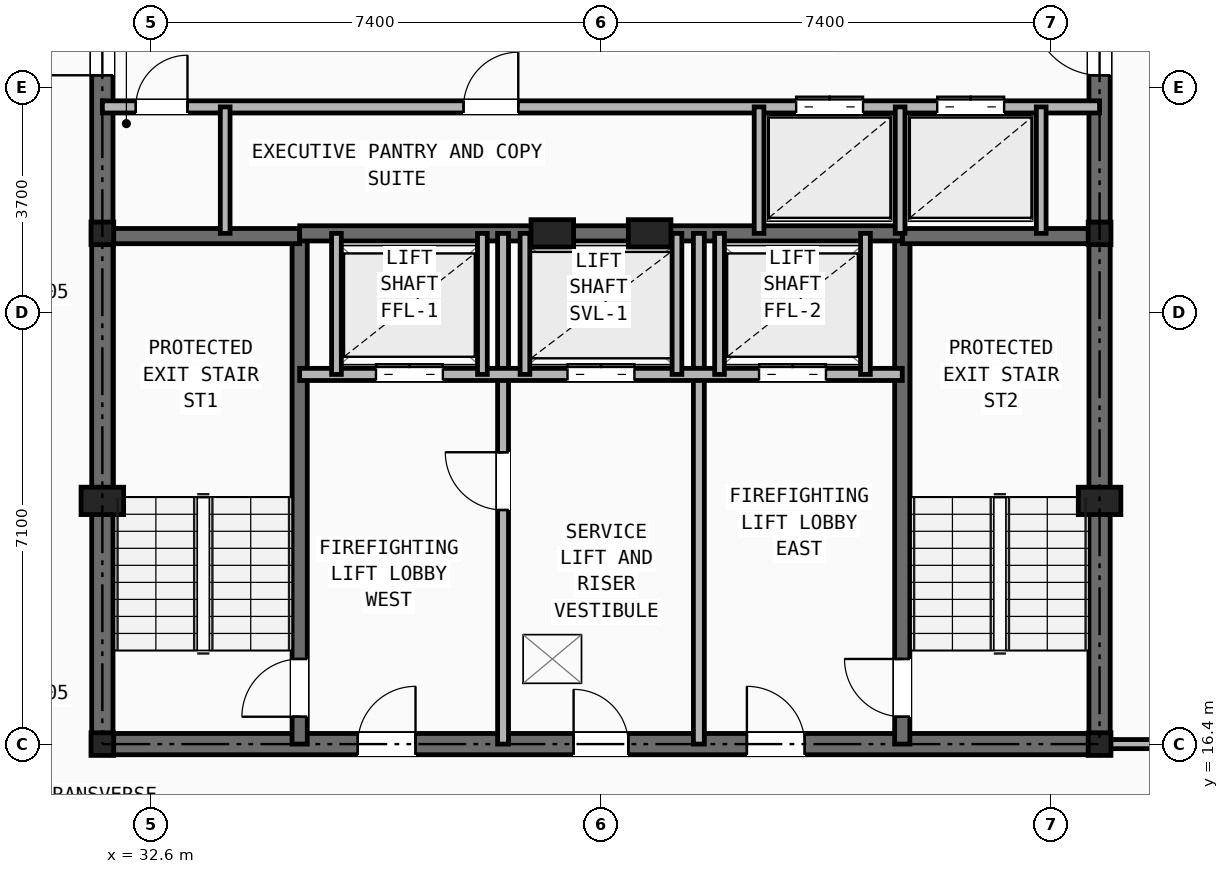
"""IFC4 building model, lengths in metres.
Left out: names, types, materials, properties, quantities, classifications, styles, units other than length and angle.
Written with IfcOpenShell. Run it as: python <this file> out.ifc"""

import sys

from ifc_helpers import new_model, si_unit, direction, frame, frame_2d, origin, origin_2d, place, context, subcontext, project, spatial, rectangle, i_section, extrude, element, fill, save


model = new_model("IFC4")
c1 = context("Model", 3, precision=1e-05, world=origin(), true_north=direction((0.0, 1.0)))
c2 = subcontext(c1, "Body", "Model", "MODEL_VIEW")
j1 = project(units=[si_unit("LENGTHUNIT", "METRE"), si_unit("PLANEANGLEUNIT", "RADIAN")], contexts=[c1])
p1 = place(None, origin())
s1 = spatial("IfcSite", under=j1, at=p1, CompositionType="ELEMENT")
p2 = place(p1, origin())
s2 = spatial("IfcBuilding", under=s1, at=p2, CompositionType="ELEMENT")
p3 = place(p2, frame((0.0, 0.0, 243.4)))
s3 = spatial("IfcBuildingStorey", under=s2, at=p3, CompositionType="ELEMENT", Elevation=243.4)
for number, where, z_axis, x_axis in (
    (1, (31.8, 16.4, 0.0), (0.0, 0.0, 1.0), (1.0, 0.0, 0.0)),
    (2, (48.2, 16.4, 0.0), (0.0, 0.0, 1.0), (1.0, 0.0, 0.0)),
    (3, (31.8, 24.8, 0.0), (0.0, 0.0, 1.0), (1.0, 0.0, 0.0)),
    (4, (48.2, 24.8, 0.0), (0.0, 0.0, 1.0), (1.0, 0.0, 0.0)),
):
    element("IfcColumn", number, at=place(p3, frame(where, z_axis=z_axis, x_axis=x_axis)), inside=s3, PredefinedType="COLUMN", context=c2, shape_type="SweptSolid", body=[
        extrude(i_section(OverallWidth=0.374, OverallDepth=0.372, WebThickness=0.016, FlangeThickness=0.026, at=origin_2d()), origin(), (0.0, 0.0, 1.0), 3.5),
    ])
for number, where, z_axis, x_axis in (
    (5, (31.8, 20.4, 0.0), (0.0, 0.0, 1.0), (1.0, 0.0, 0.0)),
    (6, (48.2, 20.4, 0.0), (0.0, 0.0, 1.0), (1.0, 0.0, 0.0)),
    (7, (39.2, 24.8, 0.0), (0.0, 0.0, 1.0), (1.0, 0.0, 0.0)),
    (8, (40.8, 24.8, 0.0), (0.0, 0.0, 1.0), (1.0, 0.0, 0.0)),
):
    element("IfcColumn", number, at=place(p3, frame(where, z_axis=z_axis, x_axis=x_axis)), inside=s3, PredefinedType="PILASTER", context=c2, shape_type="SweptSolid", body=[
        extrude(rectangle(XDim=0.7, YDim=0.45, at=origin_2d()), origin(), (0.0, 0.0, 1.0), 3.5),
    ])
p4 = place(p3, frame((31.8, 16.4, 0.0), z_axis=(0.0, 0.0, 1.0), x_axis=(1.0, 0.0, 0.0)))
e9 = element("IfcWall", 9, at=p4, inside=s3, PredefinedType="SHEAR", context=c2, shape_type="SweptSolid", body=[
    extrude(rectangle(XDim=16.4, YDim=0.35, at=frame_2d((8.2, 0.0))), origin(), (0.0, 0.0, 1.0), 3.25),
])
p5 = place(p4, frame((7.75, 0.0, 0.0)))
e10 = element("IfcOpeningElement", 10, at=p5, cuts=e9, PredefinedType="OPENING", context=c2, shape_type="SweptSolid", body=[
    extrude(rectangle(XDim=0.9, YDim=2.1, at=frame_2d((0.45, 1.05))), frame((0.0, 0.185, 0.0), z_axis=(0.0, -1.0, 0.0), x_axis=(1.0, 0.0, 0.0)), (0.0, 0.0, 1.0), 0.37),
])
p6 = place(p4, frame((4.2, 0.0, 0.0)))
e11 = element("IfcOpeningElement", 11, at=p6, cuts=e9, PredefinedType="OPENING", context=c2, shape_type="SweptSolid", body=[
    extrude(rectangle(XDim=0.95, YDim=2.1, at=frame_2d((0.475, 1.05))), frame((0.0, 0.185, 0.0), z_axis=(0.0, -1.0, 0.0), x_axis=(1.0, 0.0, 0.0)), (0.0, 0.0, 1.0), 0.37),
])
p7 = place(p4, frame((10.6, 0.0, 0.0)))
e12 = element("IfcOpeningElement", 12, at=p7, cuts=e9, PredefinedType="OPENING", context=c2, shape_type="SweptSolid", body=[
    extrude(rectangle(XDim=0.95, YDim=2.1, at=frame_2d((0.475, 1.05))), frame((0.0, 0.185, 0.0), z_axis=(0.0, -1.0, 0.0), x_axis=(1.0, 0.0, 0.0)), (0.0, 0.0, 1.0), 0.37),
])
p8 = place(p3, frame((31.8, 16.4, 0.0), z_axis=(0.0, 0.0, 1.0), x_axis=(0.0, 1.0, 0.0)))
e13 = element("IfcWall", 13, at=p8, inside=s3, PredefinedType="SHEAR", context=c2, shape_type="SweptSolid", body=[
    extrude(rectangle(XDim=14.8, YDim=0.35, at=frame_2d((7.4, 0.0))), origin(), (0.0, 0.0, 1.0), 3.25),
])
p9 = place(p8, frame((11.0, 0.0, 0.0)))
e14 = element("IfcOpeningElement", 14, at=p9, cuts=e13, PredefinedType="OPENING", context=c2, shape_type="SweptSolid", body=[
    extrude(rectangle(XDim=1.1, YDim=2.15, at=frame_2d((0.55, 1.075))), frame((0.0, 0.185, 0.0), z_axis=(0.0, -1.0, 0.0), x_axis=(1.0, 0.0, 0.0)), (0.0, 0.0, 1.0), 0.37),
])
p10 = place(p3, frame((48.2, 16.4, 0.0), z_axis=(0.0, 0.0, 1.0), x_axis=(0.0, 1.0, 0.0)))
e15 = element("IfcWall", 15, at=p10, inside=s3, PredefinedType="SHEAR", context=c2, shape_type="SweptSolid", body=[
    extrude(rectangle(XDim=14.8, YDim=0.35, at=frame_2d((7.4, 0.0))), origin(), (0.0, 0.0, 1.0), 3.25),
])
p11 = place(p10, frame((11.0, 0.0, 0.0)))
e16 = element("IfcOpeningElement", 16, at=p11, cuts=e15, PredefinedType="OPENING", context=c2, shape_type="SweptSolid", body=[
    extrude(rectangle(XDim=1.1, YDim=2.15, at=frame_2d((0.55, 1.075))), frame((0.0, 0.185, 0.0), z_axis=(0.0, -1.0, 0.0), x_axis=(1.0, 0.0, 0.0)), (0.0, 0.0, 1.0), 0.37),
])
p12 = place(p3, frame((35.045, 16.4, 0.0), z_axis=(0.0, 0.0, 1.0), x_axis=(0.0, 1.0, 0.0)))
e17 = element("IfcWall", 17, at=p12, inside=s3, PredefinedType="SHEAR", context=c2, shape_type="SweptSolid", body=[
    extrude(rectangle(XDim=8.4, YDim=0.25, at=frame_2d((4.2, 0.0))), origin(), (0.0, 0.0, 1.0), 3.25),
])
p13 = place(p12, frame((0.45, 0.0, 0.0)))
e18 = element("IfcOpeningElement", 18, at=p13, cuts=e17, PredefinedType="OPENING", context=c2, shape_type="SweptSolid", body=[
    extrude(rectangle(XDim=0.95, YDim=2.1, at=frame_2d((0.475, 1.05))), frame((0.0, 0.135, 0.0), z_axis=(0.0, -1.0, 0.0), x_axis=(1.0, 0.0, 0.0)), (0.0, 0.0, 1.0), 0.27),
])
p14 = place(p3, frame((31.8, 24.755, 0.0), z_axis=(0.0, 0.0, 1.0), x_axis=(1.0, 0.0, 0.0)))
e19 = element("IfcWall", 19, at=p14, inside=s3, PredefinedType="SHEAR", context=c2, shape_type="SweptSolid", body=[
    extrude(rectangle(XDim=3.245, YDim=0.25, at=frame_2d((1.623, 0.0))), origin(), (0.0, 0.0, 1.0), 3.25),
])
p15 = place(p3, frame((44.955, 16.4, 0.0), z_axis=(0.0, 0.0, 1.0), x_axis=(0.0, 1.0, 0.0)))
e20 = element("IfcWall", 20, at=p15, inside=s3, PredefinedType="SHEAR", context=c2, shape_type="SweptSolid", body=[
    extrude(rectangle(XDim=8.4, YDim=0.25, at=frame_2d((4.2, 0.0))), origin(), (0.0, 0.0, 1.0), 3.25),
])
p16 = place(p15, frame((0.45, 0.0, 0.0)))
e21 = element("IfcOpeningElement", 21, at=p16, cuts=e20, PredefinedType="OPENING", context=c2, shape_type="SweptSolid", body=[
    extrude(rectangle(XDim=0.95, YDim=2.1, at=frame_2d((0.475, 1.05))), frame((0.0, 0.135, 0.0), z_axis=(0.0, -1.0, 0.0), x_axis=(1.0, 0.0, 0.0)), (0.0, 0.0, 1.0), 0.27),
])
p17 = place(p3, frame((44.955, 24.755, 0.0), z_axis=(0.0, 0.0, 1.0), x_axis=(1.0, 0.0, 0.0)))
e22 = element("IfcWall", 22, at=p17, inside=s3, PredefinedType="SHEAR", context=c2, shape_type="SweptSolid", body=[
    extrude(rectangle(XDim=3.245, YDim=0.25, at=frame_2d((1.623, 0.0))), origin(), (0.0, 0.0, 1.0), 3.25),
])
p18 = place(p3, frame((35.045, 24.8, 0.0), z_axis=(0.0, 0.0, 1.0), x_axis=(1.0, 0.0, 0.0)))
e23 = element("IfcWall", 23, at=p18, inside=s3, PredefinedType="SHEAR", context=c2, shape_type="SweptSolid", body=[
    extrude(rectangle(XDim=9.91, YDim=0.25, at=frame_2d((4.955, 0.0))), origin(), (0.0, 0.0, 1.0), 3.25),
])
p19 = place(p3, frame((38.39, 16.4, 0.0), z_axis=(0.0, 0.0, 1.0), x_axis=(0.0, 1.0, 0.0)))
e24 = element("IfcWall", 24, at=p19, inside=s3, PredefinedType="PARTITIONING", context=c2, shape_type="SweptSolid", body=[
    extrude(rectangle(XDim=8.4, YDim=0.18, at=frame_2d((4.2, 0.0))), origin(), (0.0, 0.0, 1.0), 2.705),
])
p20 = place(p19, frame((3.85, 0.0, 0.0)))
e25 = element("IfcOpeningElement", 25, at=p20, cuts=e24, PredefinedType="OPENING", context=c2, shape_type="SweptSolid", body=[
    extrude(rectangle(XDim=0.95, YDim=2.1, at=frame_2d((0.475, 1.05))), frame((0.0, 0.1, 0.0), z_axis=(0.0, -1.0, 0.0), x_axis=(1.0, 0.0, 0.0)), (0.0, 0.0, 1.0), 0.2),
])
p21 = place(p3, frame((41.61, 16.4, 0.0), z_axis=(0.0, 0.0, 1.0), x_axis=(0.0, 1.0, 0.0)))
e26 = element("IfcWall", 26, at=p21, inside=s3, PredefinedType="PARTITIONING", context=c2, shape_type="SweptSolid", body=[
    extrude(rectangle(XDim=8.4, YDim=0.18, at=frame_2d((4.2, 0.0))), origin(), (0.0, 0.0, 1.0), 2.705),
])
p22 = place(p3, frame((35.045, 22.48, 0.0), z_axis=(0.0, 0.0, 1.0), x_axis=(1.0, 0.0, 0.0)))
e27 = element("IfcWall", 27, at=p22, inside=s3, PredefinedType="SOLIDWALL", context=c2, shape_type="SweptSolid", body=[
    extrude(rectangle(XDim=9.91, YDim=0.2, at=frame_2d((4.955, 0.0))), origin(), (0.0, 0.0, 1.0), 3.25),
])
p23 = place(p22, frame((1.255, 0.0, 0.0)))
e28 = element("IfcOpeningElement", 28, at=p23, cuts=e27, PredefinedType="OPENING", context=c2, shape_type="SweptSolid", body=[
    extrude(rectangle(XDim=1.1, YDim=2.15, at=frame_2d((0.55, 1.075))), frame((0.0, 0.11, 0.0), z_axis=(0.0, -1.0, 0.0), x_axis=(1.0, 0.0, 0.0)), (0.0, 0.0, 1.0), 0.22),
])
p24 = place(p22, frame((7.555, 0.0, 0.0)))
e29 = element("IfcOpeningElement", 29, at=p24, cuts=e27, PredefinedType="OPENING", context=c2, shape_type="SweptSolid", body=[
    extrude(rectangle(XDim=1.1, YDim=2.15, at=frame_2d((0.55, 1.075))), frame((0.0, 0.11, 0.0), z_axis=(0.0, -1.0, 0.0), x_axis=(1.0, 0.0, 0.0)), (0.0, 0.0, 1.0), 0.22),
])
p25 = place(p22, frame((4.405, 0.0, 0.0)))
e30 = element("IfcOpeningElement", 30, at=p25, cuts=e27, PredefinedType="OPENING", context=c2, shape_type="SweptSolid", body=[
    extrude(rectangle(XDim=1.1, YDim=2.15, at=frame_2d((0.55, 1.075))), frame((0.0, 0.11, 0.0), z_axis=(0.0, -1.0, 0.0), x_axis=(1.0, 0.0, 0.0)), (0.0, 0.0, 1.0), 0.22),
])
for number, where, z_axis, x_axis in (
    (31, (35.65, 22.48, 0.0), (0.0, 0.0, 1.0), (0.0, 1.0, 0.0)),
    (32, (38.05, 22.48, 0.0), (0.0, 0.0, 1.0), (0.0, 1.0, 0.0)),
    (33, (41.95, 22.48, 0.0), (0.0, 0.0, 1.0), (0.0, 1.0, 0.0)),
    (34, (44.35, 22.48, 0.0), (0.0, 0.0, 1.0), (0.0, 1.0, 0.0)),
    (35, (38.75, 22.48, 0.0), (0.0, 0.0, 1.0), (0.0, 1.0, 0.0)),
    (36, (41.25, 22.48, 0.0), (0.0, 0.0, 1.0), (0.0, 1.0, 0.0)),
):
    element("IfcWall", number, at=place(p3, frame(where, z_axis=z_axis, x_axis=x_axis)), inside=s3, PredefinedType="SOLIDWALL", context=c2, shape_type="SweptSolid", body=[
        extrude(rectangle(XDim=2.32, YDim=0.16, at=frame_2d((1.16, 0.0))), origin(), (0.0, 0.0, 1.0), 3.25),
    ])
p26 = place(p3, frame((31.8, 26.88, 0.0), z_axis=(0.0, 0.0, 1.0), x_axis=(1.0, 0.0, 0.0)))
e37 = element("IfcWall", 37, at=p26, inside=s3, PredefinedType="SOLIDWALL", context=c2, shape_type="SweptSolid", body=[
    extrude(rectangle(XDim=16.4, YDim=0.2, at=frame_2d((8.2, 0.0))), origin(), (0.0, 0.0, 1.0), 2.705),
])
p27 = place(p26, frame((0.55, 0.0, 0.0)))
e38 = element("IfcOpeningElement", 38, at=p27, cuts=e37, PredefinedType="OPENING", context=c2, shape_type="SweptSolid", body=[
    extrude(rectangle(XDim=0.85, YDim=2.05, at=frame_2d((0.425, 1.025))), frame((0.0, 0.11, 0.0), z_axis=(0.0, -1.0, 0.0), x_axis=(1.0, 0.0, 0.0)), (0.0, 0.0, 1.0), 0.22),
])
p28 = place(p26, frame((5.94, 0.0, 0.0)))
e39 = element("IfcOpeningElement", 39, at=p28, cuts=e37, PredefinedType="OPENING", context=c2, shape_type="SweptSolid", body=[
    extrude(rectangle(XDim=0.9, YDim=2.1, at=frame_2d((0.45, 1.05))), frame((0.0, 0.11, 0.0), z_axis=(0.0, -1.0, 0.0), x_axis=(1.0, 0.0, 0.0)), (0.0, 0.0, 1.0), 0.22),
])
p29 = place(p26, frame((11.41, 0.0, 0.0)))
e40 = element("IfcOpeningElement", 40, at=p29, cuts=e37, PredefinedType="OPENING", context=c2, shape_type="SweptSolid", body=[
    extrude(rectangle(XDim=1.1, YDim=2.15, at=frame_2d((0.55, 1.075))), frame((0.0, 0.11, 0.0), z_axis=(0.0, -1.0, 0.0), x_axis=(1.0, 0.0, 0.0)), (0.0, 0.0, 1.0), 0.22),
])
p30 = place(p26, frame((13.73, 0.0, 0.0)))
e41 = element("IfcOpeningElement", 41, at=p30, cuts=e37, PredefinedType="OPENING", context=c2, shape_type="SweptSolid", body=[
    extrude(rectangle(XDim=1.1, YDim=2.15, at=frame_2d((0.55, 1.075))), frame((0.0, 0.11, 0.0), z_axis=(0.0, -1.0, 0.0), x_axis=(1.0, 0.0, 0.0)), (0.0, 0.0, 1.0), 0.22),
])
for number, where, z_axis, x_axis in (
    (42, (33.82, 24.8, 0.0), (0.0, 0.0, 1.0), (0.0, 1.0, 0.0)),
    (43, (42.6, 24.8, 0.0), (0.0, 0.0, 1.0), (0.0, 1.0, 0.0)),
    (44, (44.92, 24.8, 0.0), (0.0, 0.0, 1.0), (0.0, 1.0, 0.0)),
    (45, (47.24, 24.8, 0.0), (0.0, 0.0, 1.0), (0.0, 1.0, 0.0)),
):
    element("IfcWall", number, at=place(p3, frame(where, z_axis=z_axis, x_axis=x_axis)), inside=s3, PredefinedType="SOLIDWALL", context=c2, shape_type="SweptSolid", body=[
        extrude(rectangle(XDim=2.08, YDim=0.16, at=frame_2d((1.04, 0.0))), origin(), (0.0, 0.0, 1.0), 3.25),
    ])
p31 = place(p3, frame((48.2, 16.4, 0.0), z_axis=(0.0, 0.0, 1.0), x_axis=(1.0, 0.0, 0.0)))
e46 = element("IfcWall", 46, at=p31, inside=s3, PredefinedType="PARTITIONING", context=c2, shape_type="SweptSolid", body=[
    extrude(rectangle(XDim=15.441, YDim=0.15, at=frame_2d((7.72, 0.0))), origin(), (0.0, 0.0, 1.0), 2.292),
])
p32 = place(p5, origin())
e47 = element("IfcDoor", 47, at=p32, inside=s3, OperationType="SINGLE_SWING_LEFT", PredefinedType="DOOR", context=c2, shape_type="SweptSolid", body=[
    extrude(rectangle(XDim=0.9, YDim=2.1, at=frame_2d((0.45, 1.05))), frame((0.0, 0.025, 0.0), z_axis=(0.0, -1.0, 0.0), x_axis=(1.0, 0.0, 0.0)), (0.0, 0.0, 1.0), 0.05),
])
fill(e10, e47)
p33 = place(p20, origin())
e48 = element("IfcDoor", 48, at=p33, inside=s3, OperationType="SINGLE_SWING_RIGHT", PredefinedType="DOOR", context=c2, shape_type="SweptSolid", body=[
    extrude(rectangle(XDim=0.95, YDim=2.1, at=frame_2d((0.475, 1.05))), frame((0.0, 0.025, 0.0), z_axis=(0.0, -1.0, 0.0), x_axis=(1.0, 0.0, 0.0)), (0.0, 0.0, 1.0), 0.05),
])
fill(e25, e48)
p34 = place(p13, origin())
e49 = element("IfcDoor", 49, at=p34, inside=s3, OperationType="SINGLE_SWING_LEFT", PredefinedType="DOOR", context=c2, shape_type="SweptSolid", body=[
    extrude(rectangle(XDim=0.95, YDim=2.1, at=frame_2d((0.475, 1.05))), frame((0.0, 0.025, 0.0), z_axis=(0.0, -1.0, 0.0), x_axis=(1.0, 0.0, 0.0)), (0.0, 0.0, 1.0), 0.05),
])
fill(e18, e49)
p35 = place(p16, origin())
e50 = element("IfcDoor", 50, at=p35, inside=s3, OperationType="SINGLE_SWING_RIGHT", PredefinedType="DOOR", context=c2, shape_type="SweptSolid", body=[
    extrude(rectangle(XDim=0.95, YDim=2.1, at=frame_2d((0.475, 1.05))), frame((0.0, 0.025, 0.0), z_axis=(0.0, -1.0, 0.0), x_axis=(1.0, 0.0, 0.0)), (0.0, 0.0, 1.0), 0.05),
])
fill(e21, e50)
p36 = place(p6, origin())
e51 = element("IfcDoor", 51, at=p36, inside=s3, OperationType="SINGLE_SWING_RIGHT", PredefinedType="DOOR", context=c2, shape_type="SweptSolid", body=[
    extrude(rectangle(XDim=0.95, YDim=2.1, at=frame_2d((0.475, 1.05))), frame((0.0, 0.025, 0.0), z_axis=(0.0, -1.0, 0.0), x_axis=(1.0, 0.0, 0.0)), (0.0, 0.0, 1.0), 0.05),
])
fill(e11, e51)
p37 = place(p7, origin())
e52 = element("IfcDoor", 52, at=p37, inside=s3, OperationType="SINGLE_SWING_LEFT", PredefinedType="DOOR", context=c2, shape_type="SweptSolid", body=[
    extrude(rectangle(XDim=0.95, YDim=2.1, at=frame_2d((0.475, 1.05))), frame((0.0, 0.025, 0.0), z_axis=(0.0, -1.0, 0.0), x_axis=(1.0, 0.0, 0.0)), (0.0, 0.0, 1.0), 0.05),
])
fill(e12, e52)
p38 = place(p23, origin())
e53 = element("IfcDoor", 53, at=p38, inside=s3, OperationType="DOUBLE_DOOR_SLIDING", PredefinedType="DOOR", context=c2, shape_type="SweptSolid", body=[
    extrude(rectangle(XDim=1.1, YDim=2.15, at=frame_2d((0.55, 1.075))), frame((0.0, 0.025, 0.0), z_axis=(0.0, -1.0, 0.0), x_axis=(1.0, 0.0, 0.0)), (0.0, 0.0, 1.0), 0.05),
])
fill(e28, e53)
p39 = place(p24, origin())
e54 = element("IfcDoor", 54, at=p39, inside=s3, OperationType="DOUBLE_DOOR_SLIDING", PredefinedType="DOOR", context=c2, shape_type="SweptSolid", body=[
    extrude(rectangle(XDim=1.1, YDim=2.15, at=frame_2d((0.55, 1.075))), frame((0.0, 0.025, 0.0), z_axis=(0.0, -1.0, 0.0), x_axis=(1.0, 0.0, 0.0)), (0.0, 0.0, 1.0), 0.05),
])
fill(e29, e54)
p40 = place(p25, origin())
e55 = element("IfcDoor", 55, at=p40, inside=s3, OperationType="DOUBLE_DOOR_SLIDING", PredefinedType="DOOR", context=c2, shape_type="SweptSolid", body=[
    extrude(rectangle(XDim=1.1, YDim=2.15, at=frame_2d((0.55, 1.075))), frame((0.0, 0.025, 0.0), z_axis=(0.0, -1.0, 0.0), x_axis=(1.0, 0.0, 0.0)), (0.0, 0.0, 1.0), 0.05),
])
fill(e30, e55)
p41 = place(p27, origin())
e56 = element("IfcDoor", 56, at=p41, inside=s3, OperationType="SINGLE_SWING_RIGHT", PredefinedType="DOOR", context=c2, shape_type="SweptSolid", body=[
    extrude(rectangle(XDim=0.85, YDim=2.05, at=frame_2d((0.425, 1.025))), frame((0.0, 0.025, 0.0), z_axis=(0.0, -1.0, 0.0), x_axis=(1.0, 0.0, 0.0)), (0.0, 0.0, 1.0), 0.05),
])
fill(e38, e56)
p42 = place(p9, origin())
e57 = element("IfcDoor", 57, at=p42, inside=s3, OperationType="SINGLE_SWING_LEFT", PredefinedType="DOOR", context=c2, shape_type="SweptSolid", body=[
    extrude(rectangle(XDim=1.1, YDim=2.15, at=frame_2d((0.55, 1.075))), frame((0.0, 0.025, 0.0), z_axis=(0.0, -1.0, 0.0), x_axis=(1.0, 0.0, 0.0)), (0.0, 0.0, 1.0), 0.05),
])
fill(e14, e57)
p43 = place(p11, origin())
e58 = element("IfcDoor", 58, at=p43, inside=s3, OperationType="SINGLE_SWING_RIGHT", PredefinedType="DOOR", context=c2, shape_type="SweptSolid", body=[
    extrude(rectangle(XDim=1.1, YDim=2.15, at=frame_2d((0.55, 1.075))), frame((0.0, 0.025, 0.0), z_axis=(0.0, -1.0, 0.0), x_axis=(1.0, 0.0, 0.0)), (0.0, 0.0, 1.0), 0.05),
])
fill(e16, e58)
p44 = place(p28, origin())
e59 = element("IfcDoor", 59, at=p44, inside=s3, OperationType="SINGLE_SWING_RIGHT", PredefinedType="DOOR", context=c2, shape_type="SweptSolid", body=[
    extrude(rectangle(XDim=0.9, YDim=2.1, at=frame_2d((0.45, 1.05))), frame((0.0, 0.025, 0.0), z_axis=(0.0, -1.0, 0.0), x_axis=(1.0, 0.0, 0.0)), (0.0, 0.0, 1.0), 0.05),
])
fill(e39, e59)
p45 = place(p29, origin())
e60 = element("IfcDoor", 60, at=p45, inside=s3, OperationType="DOUBLE_DOOR_SLIDING", PredefinedType="DOOR", context=c2, shape_type="SweptSolid", body=[
    extrude(rectangle(XDim=1.1, YDim=2.15, at=frame_2d((0.55, 1.075))), frame((0.0, 0.025, 0.0), z_axis=(0.0, -1.0, 0.0), x_axis=(1.0, 0.0, 0.0)), (0.0, 0.0, 1.0), 0.05),
])
fill(e40, e60)
p46 = place(p30, origin())
e61 = element("IfcDoor", 61, at=p46, inside=s3, OperationType="DOUBLE_DOOR_SLIDING", PredefinedType="DOOR", context=c2, shape_type="SweptSolid", body=[
    extrude(rectangle(XDim=1.1, YDim=2.15, at=frame_2d((0.55, 1.075))), frame((0.0, 0.025, 0.0), z_axis=(0.0, -1.0, 0.0), x_axis=(1.0, 0.0, 0.0)), (0.0, 0.0, 1.0), 0.05),
])
fill(e41, e61)
save(model, sys.argv[1])
